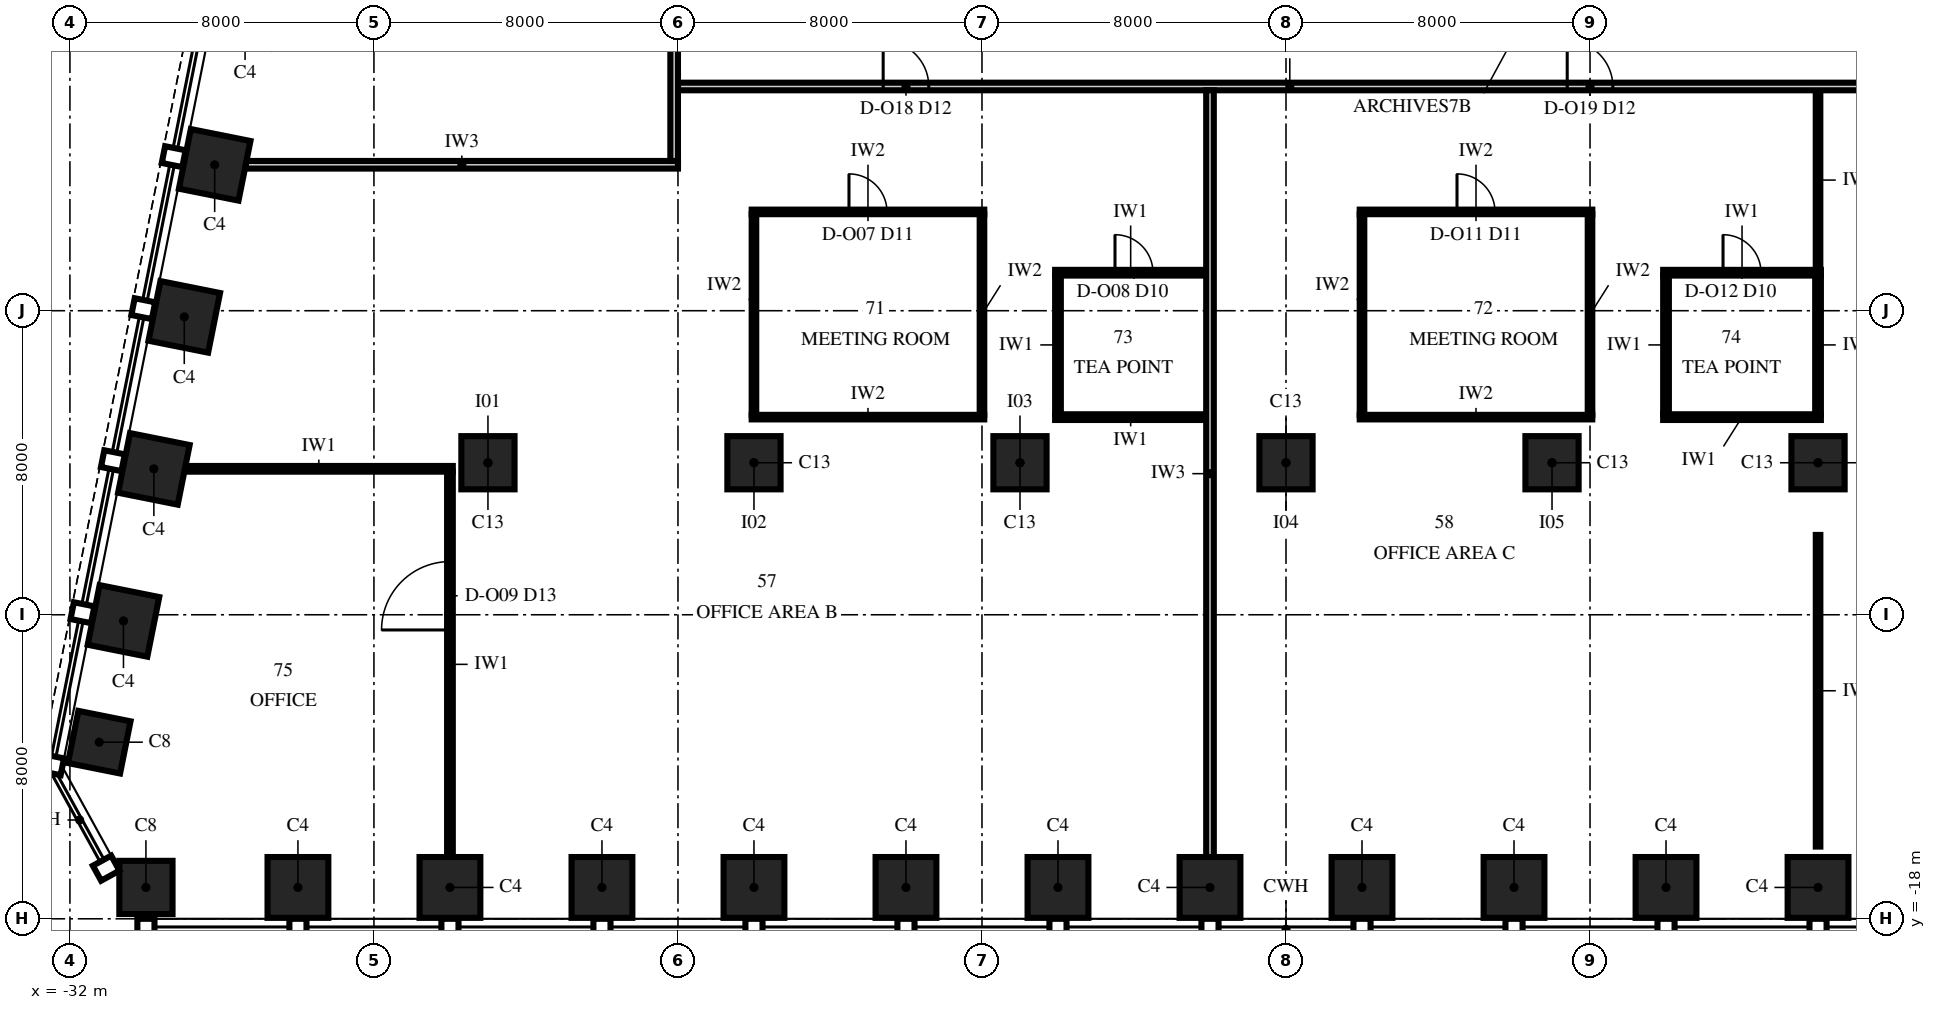
"""IFC4 building model, lengths in metres.
Left out: names, types, materials, properties, quantities, classifications, styles, units other than length and angle.
Written with IfcOpenShell. Run it as: python <this file> out.ifc"""

import sys

from ifc_helpers import new_model, si_unit, direction, frame, frame_2d, origin, origin_2d, place, context, subcontext, project, spatial, rectangle, extrude, element, fill, save


model = new_model("IFC4")
c1 = context("Model", 3, precision=1e-05, world=origin(), true_north=direction((0.0, 1.0)))
c2 = subcontext(c1, "Body", "Model", "MODEL_VIEW")
j1 = project(units=[si_unit("LENGTHUNIT", "METRE"), si_unit("PLANEANGLEUNIT", "RADIAN")], contexts=[c1])
p1 = place(None, origin())
s1 = spatial("IfcSite", under=j1, at=p1, CompositionType="ELEMENT")
p2 = place(p1, origin())
s2 = spatial("IfcBuilding", under=s1, at=p2, CompositionType="ELEMENT")
p3 = place(p2, frame((0.0, 0.0, 226.0)))
s3 = spatial("IfcBuildingStorey", under=s2, at=p3, CompositionType="ELEMENT", Elevation=226.0)
p4 = place(p3, frame((-30.0, -17.175, 0.0), z_axis=(0.0, 0.0, 1.0), x_axis=(1.0, 0.0, 0.0)))
e1 = element("IfcColumn", 1, at=p4, inside=s3, PredefinedType="COLUMN", context=c2, shape_type="SweptSolid", body=[
    extrude(rectangle(XDim=1.4, YDim=1.4, at=origin_2d()), origin(), (0.0, 0.0, 1.0), 4.0),
])
for number, where, z_axis, x_axis in (
    (2, (-26.0, -17.175, 0.0), (0.0, 0.0, 1.0), (1.0, 0.0, 0.0)),
    (3, (-22.0, -17.175, 0.0), (0.0, 0.0, 1.0), (1.0, 0.0, 0.0)),
    (4, (-18.0, -17.175, 0.0), (0.0, 0.0, 1.0), (1.0, 0.0, 0.0)),
    (5, (-14.0, -17.175, 0.0), (0.0, 0.0, 1.0), (1.0, 0.0, 0.0)),
    (6, (-10.0, -17.175, 0.0), (0.0, 0.0, 1.0), (1.0, 0.0, 0.0)),
    (7, (-6.0, -17.175, 0.0), (0.0, 0.0, 1.0), (1.0, 0.0, 0.0)),
    (8, (-2.0, -17.175, 0.0), (0.0, 0.0, 1.0), (1.0, 0.0, 0.0)),
    (9, (2.0, -17.175, 0.0), (0.0, 0.0, 1.0), (1.0, 0.0, 0.0)),
    (10, (6.0, -17.175, 0.0), (0.0, 0.0, 1.0), (1.0, 0.0, 0.0)),
    (11, (10.0, -17.175, 0.0), (0.0, 0.0, 1.0), (1.0, 0.0, 0.0)),
    (12, (14.0, -17.175, 0.0), (0.0, 0.0, 1.0), (1.0, 0.0, 0.0)),
    (13, (-28.191, 1.838, 0.0), (0.0, 0.0, 1.0), (-0.196, -0.981, 0.0)),
    (14, (-28.991, -2.162, 0.0), (0.0, 0.0, 1.0), (-0.196, -0.981, 0.0)),
    (15, (-29.791, -6.162, 0.0), (0.0, 0.0, 1.0), (-0.196, -0.981, 0.0)),
    (16, (-30.591, -10.162, 0.0), (0.0, 0.0, 1.0), (-0.196, -0.981, 0.0)),
):
    element("IfcColumn", number, at=place(p3, frame(where, z_axis=z_axis, x_axis=x_axis)), inside=s3, PredefinedType="COLUMN", context=c2, shape_type="SweptSolid", body=[
        extrude(rectangle(XDim=1.6, YDim=1.6, at=origin_2d()), origin(), (0.0, 0.0, 1.0), 4.0),
    ])
for number, where, z_axis, x_axis in (
    (17, (-31.229, -13.353, 0.0), (0.0, 0.0, 1.0), (-0.196, -0.981, 0.0)),
    (18, (-21.0, -6.0, 0.0), (0.0, 0.0, 1.0), (1.0, 0.0, 0.0)),
    (19, (-14.0, -6.0, 0.0), (0.0, 0.0, 1.0), (1.0, 0.0, 0.0)),
    (20, (-7.0, -6.0, 0.0), (0.0, 0.0, 1.0), (1.0, 0.0, 0.0)),
    (21, (0.0, -6.0, 0.0), (0.0, 0.0, 1.0), (1.0, 0.0, 0.0)),
    (22, (7.0, -6.0, 0.0), (0.0, 0.0, 1.0), (1.0, 0.0, 0.0)),
    (23, (14.0, -6.0, 0.0), (0.0, 0.0, 1.0), (1.0, 0.0, 0.0)),
):
    element("IfcColumn", number, at=place(p3, frame(where, z_axis=z_axis, x_axis=x_axis)), inside=s3, PredefinedType="COLUMN", context=c2, shape_type="SweptSolid", body=[
        extrude(rectangle(XDim=1.4, YDim=1.4, at=origin_2d()), origin(), (0.0, 0.0, 1.0), 4.0),
    ])
p5 = place(p3, frame((-28.975, -6.16, 0.0), z_axis=(0.0, 0.0, 1.0), x_axis=(1.0, 0.0, 0.0)))
e24 = element("IfcWall", 24, at=p5, inside=s3, PredefinedType="PARTITIONING", context=c2, shape_type="SweptSolid", body=[
    extrude(rectangle(XDim=7.05, YDim=0.15, at=frame_2d((3.525, 0.0))), origin(), (0.0, 0.0, 1.0), 2.842),
])
p6 = place(p3, frame((-14.06, -4.8, 0.0), z_axis=(0.0, 0.0, 1.0), x_axis=(1.0, 0.0, 0.0)))
e25 = element("IfcWall", 25, at=p6, inside=s3, PredefinedType="PARTITIONING", context=c2, shape_type="SweptSolid", body=[
    extrude(rectangle(XDim=6.12, YDim=0.12, at=frame_2d((3.06, 0.0))), origin(), (0.0, 0.0, 1.0), 3.25),
])
p7 = place(p3, frame((-6.075, -4.8, 0.0), z_axis=(0.0, 0.0, 1.0), x_axis=(1.0, 0.0, 0.0)))
e26 = element("IfcWall", 26, at=p7, inside=s3, PredefinedType="PARTITIONING", context=c2, shape_type="SweptSolid", body=[
    extrude(rectangle(XDim=3.975, YDim=0.15, at=frame_2d((1.987, 0.0))), origin(), (0.0, 0.0, 1.0), 3.25),
])
p8 = place(p3, frame((1.94, -4.8, 0.0), z_axis=(0.0, 0.0, 1.0), x_axis=(1.0, 0.0, 0.0)))
e27 = element("IfcWall", 27, at=p8, inside=s3, PredefinedType="PARTITIONING", context=c2, shape_type="SweptSolid", body=[
    extrude(rectangle(XDim=6.12, YDim=0.12, at=frame_2d((3.06, 0.0))), origin(), (0.0, 0.0, 1.0), 3.25),
])
p9 = place(p3, frame((9.925, -4.8, 0.0), z_axis=(0.0, 0.0, 1.0), x_axis=(1.0, 0.0, 0.0)))
e28 = element("IfcWall", 28, at=p9, inside=s3, PredefinedType="PARTITIONING", context=c2, shape_type="SweptSolid", body=[
    extrude(rectangle(XDim=4.15, YDim=0.15, at=frame_2d((2.075, 0.0))), origin(), (0.0, 0.0, 1.0), 3.25),
])
p10 = place(p3, frame((-6.075, -1.0, 0.0), z_axis=(0.0, 0.0, 1.0), x_axis=(1.0, 0.0, 0.0)))
e29 = element("IfcWall", 29, at=p10, inside=s3, PredefinedType="PARTITIONING", context=c2, shape_type="SweptSolid", body=[
    extrude(rectangle(XDim=3.975, YDim=0.15, at=frame_2d((1.987, 0.0))), origin(), (0.0, 0.0, 1.0), 3.25),
])
p11 = place(p10, frame((1.575, 0.0, 0.0)))
e30 = element("IfcOpeningElement", 30, at=p11, cuts=e29, PredefinedType="OPENING", context=c2, shape_type="SweptSolid", body=[
    extrude(rectangle(XDim=1.0, YDim=2.3, at=frame_2d((0.5, 1.15))), frame((0.0, 0.09, 0.0), z_axis=(0.0, -1.0, 0.0), x_axis=(1.0, 0.0, 0.0)), (0.0, 0.0, 1.0), 0.18),
])
p12 = place(p3, frame((9.925, -1.0, 0.0), z_axis=(0.0, 0.0, 1.0), x_axis=(1.0, 0.0, 0.0)))
e31 = element("IfcWall", 31, at=p12, inside=s3, PredefinedType="PARTITIONING", context=c2, shape_type="SweptSolid", body=[
    extrude(rectangle(XDim=4.15, YDim=0.15, at=frame_2d((2.075, 0.0))), origin(), (0.0, 0.0, 1.0), 3.25),
])
p13 = place(p12, frame((1.575, 0.0, 0.0)))
e32 = element("IfcOpeningElement", 32, at=p13, cuts=e31, PredefinedType="OPENING", context=c2, shape_type="SweptSolid", body=[
    extrude(rectangle(XDim=1.0, YDim=2.3, at=frame_2d((0.5, 1.15))), frame((0.0, 0.09, 0.0), z_axis=(0.0, -1.0, 0.0), x_axis=(1.0, 0.0, 0.0)), (0.0, 0.0, 1.0), 0.18),
])
p14 = place(p3, frame((-14.06, 0.6, 0.0), z_axis=(0.0, 0.0, 1.0), x_axis=(1.0, 0.0, 0.0)))
e33 = element("IfcWall", 33, at=p14, inside=s3, PredefinedType="PARTITIONING", context=c2, shape_type="SweptSolid", body=[
    extrude(rectangle(XDim=6.12, YDim=0.12, at=frame_2d((3.06, 0.0))), origin(), (0.0, 0.0, 1.0), 3.25),
])
p15 = place(p14, frame((2.56, 0.0, 0.0)))
e34 = element("IfcOpeningElement", 34, at=p15, cuts=e33, PredefinedType="OPENING", context=c2, shape_type="SweptSolid", body=[
    extrude(rectangle(XDim=1.0, YDim=2.4, at=frame_2d((0.5, 1.2))), frame((0.0, 0.075, 0.0), z_axis=(0.0, -1.0, 0.0), x_axis=(1.0, 0.0, 0.0)), (0.0, 0.0, 1.0), 0.15),
])
p16 = place(p3, frame((1.94, 0.6, 0.0), z_axis=(0.0, 0.0, 1.0), x_axis=(1.0, 0.0, 0.0)))
e35 = element("IfcWall", 35, at=p16, inside=s3, PredefinedType="PARTITIONING", context=c2, shape_type="SweptSolid", body=[
    extrude(rectangle(XDim=6.12, YDim=0.12, at=frame_2d((3.06, 0.0))), origin(), (0.0, 0.0, 1.0), 3.25),
])
p17 = place(p16, frame((2.56, 0.0, 0.0)))
e36 = element("IfcOpeningElement", 36, at=p17, cuts=e35, PredefinedType="OPENING", context=c2, shape_type="SweptSolid", body=[
    extrude(rectangle(XDim=1.0, YDim=2.4, at=frame_2d((0.5, 1.2))), frame((0.0, 0.075, 0.0), z_axis=(0.0, -1.0, 0.0), x_axis=(1.0, 0.0, 0.0)), (0.0, 0.0, 1.0), 0.15),
])
p18 = place(p3, frame((-27.375, 1.84, 0.0), z_axis=(0.0, 0.0, 1.0), x_axis=(1.0, 0.0, 0.0)))
e37 = element("IfcWall", 37, at=p18, inside=s3, PredefinedType="PARTITIONING", context=c2, shape_type="SweptSolid", body=[
    extrude(rectangle(XDim=11.375, YDim=0.2, at=frame_2d((5.688, 0.0))), origin(), (0.0, 0.0, 1.0), 3.25),
])
p19 = place(p3, frame((-16.0, 3.9, 0.0), z_axis=(0.0, 0.0, 1.0), x_axis=(1.0, 0.0, 0.0)))
e38 = element("IfcWall", 38, at=p19, inside=s3, PredefinedType="PARTITIONING", context=c2, shape_type="SweptSolid", body=[
    extrude(rectangle(XDim=32.2, YDim=0.2, at=frame_2d((16.1, 0.0))), origin(), (0.0, 0.0, 1.0), 3.25),
])
p20 = place(p19, frame((5.4, 0.0, 0.0)))
e39 = element("IfcOpeningElement", 39, at=p20, cuts=e38, PredefinedType="OPENING", context=c2, shape_type="SweptSolid", body=[
    extrude(rectangle(XDim=1.2, YDim=2.4, at=frame_2d((0.6, 1.2))), frame((0.0, 0.115, 0.0), z_axis=(0.0, -1.0, 0.0), x_axis=(1.0, 0.0, 0.0)), (0.0, 0.0, 1.0), 0.23),
])
p21 = place(p19, frame((23.4, 0.0, 0.0)))
e40 = element("IfcOpeningElement", 40, at=p21, cuts=e38, PredefinedType="OPENING", context=c2, shape_type="SweptSolid", body=[
    extrude(rectangle(XDim=1.2, YDim=2.4, at=frame_2d((0.6, 1.2))), frame((0.0, 0.115, 0.0), z_axis=(0.0, -1.0, 0.0), x_axis=(1.0, 0.0, 0.0)), (0.0, 0.0, 1.0), 0.23),
])
p22 = place(p3, frame((-22.0, -16.375, 0.0), z_axis=(0.0, 0.0, 1.0), x_axis=(0.0, 1.0, 0.0)))
e41 = element("IfcWall", 41, at=p22, inside=s3, PredefinedType="PARTITIONING", context=c2, shape_type="SweptSolid", body=[
    extrude(rectangle(XDim=10.14, YDim=0.15, at=frame_2d((5.07, 0.0))), origin(), (0.0, 0.0, 1.0), 3.25),
])
p23 = place(p22, frame((5.975, 0.0, 0.0)))
e42 = element("IfcOpeningElement", 42, at=p23, cuts=e41, PredefinedType="OPENING", context=c2, shape_type="SweptSolid", body=[
    extrude(rectangle(XDim=1.8, YDim=2.4, at=frame_2d((0.9, 1.2))), frame((0.0, 0.09, 0.0), z_axis=(0.0, -1.0, 0.0), x_axis=(1.0, 0.0, 0.0)), (0.0, 0.0, 1.0), 0.18),
])
p24 = place(p3, frame((-16.1, 1.94, 0.0), z_axis=(0.0, 0.0, 1.0), x_axis=(0.0, 1.0, 0.0)))
e43 = element("IfcWall", 43, at=p24, inside=s3, PredefinedType="PARTITIONING", context=c2, shape_type="SweptSolid", body=[
    extrude(rectangle(XDim=24.06, YDim=0.2, at=frame_2d((12.03, 0.0))), origin(), (0.0, 0.0, 1.0), 2.842),
])
p25 = place(p24, frame((6.46, 0.0, 0.0)))
e44 = element("IfcOpeningElement", 44, at=p25, cuts=e43, PredefinedType="OPENING", context=c2, shape_type="SweptSolid", body=[
    extrude(rectangle(XDim=1.2, YDim=2.4, at=frame_2d((0.6, 1.2))), frame((0.0, 0.115, 0.0), z_axis=(0.0, -1.0, 0.0), x_axis=(1.0, 0.0, 0.0)), (0.0, 0.0, 1.0), 0.23),
])
p26 = place(p3, frame((-14.0, -4.74, 0.0), z_axis=(0.0, 0.0, 1.0), x_axis=(0.0, 1.0, 0.0)))
e45 = element("IfcWall", 45, at=p26, inside=s3, PredefinedType="PARTITIONING", context=c2, shape_type="SweptSolid", body=[
    extrude(rectangle(XDim=5.28, YDim=0.12, at=frame_2d((2.64, 0.0))), origin(), (0.0, 0.0, 1.0), 3.25),
])
p27 = place(p3, frame((-8.0, -4.74, 0.0), z_axis=(0.0, 0.0, 1.0), x_axis=(0.0, 1.0, 0.0)))
e46 = element("IfcWall", 46, at=p27, inside=s3, PredefinedType="PARTITIONING", context=c2, shape_type="SweptSolid", body=[
    extrude(rectangle(XDim=5.28, YDim=0.12, at=frame_2d((2.64, 0.0))), origin(), (0.0, 0.0, 1.0), 3.85),
])
p28 = place(p3, frame((-6.0, -4.725, 0.0), z_axis=(0.0, 0.0, 1.0), x_axis=(0.0, 1.0, 0.0)))
e47 = element("IfcWall", 47, at=p28, inside=s3, PredefinedType="PARTITIONING", context=c2, shape_type="SweptSolid", body=[
    extrude(rectangle(XDim=3.65, YDim=0.15, at=frame_2d((1.825, 0.0))), origin(), (0.0, 0.0, 1.0), 3.25),
])
p29 = place(p3, frame((-2.0, -16.375, 0.0), z_axis=(0.0, 0.0, 1.0), x_axis=(0.0, 1.0, 0.0)))
e48 = element("IfcWall", 48, at=p29, inside=s3, PredefinedType="PARTITIONING", context=c2, shape_type="SweptSolid", body=[
    extrude(rectangle(XDim=20.175, YDim=0.2, at=frame_2d((10.087, 0.0))), origin(), (0.0, 0.0, 1.0), 2.842),
])
p30 = place(p3, frame((2.0, -4.74, 0.0), z_axis=(0.0, 0.0, 1.0), x_axis=(0.0, 1.0, 0.0)))
e49 = element("IfcWall", 49, at=p30, inside=s3, PredefinedType="PARTITIONING", context=c2, shape_type="SweptSolid", body=[
    extrude(rectangle(XDim=5.28, YDim=0.12, at=frame_2d((2.64, 0.0))), origin(), (0.0, 0.0, 1.0), 3.25),
])
p31 = place(p3, frame((8.0, -4.74, 0.0), z_axis=(0.0, 0.0, 1.0), x_axis=(0.0, 1.0, 0.0)))
e50 = element("IfcWall", 50, at=p31, inside=s3, PredefinedType="PARTITIONING", context=c2, shape_type="SweptSolid", body=[
    extrude(rectangle(XDim=5.28, YDim=0.12, at=frame_2d((2.64, 0.0))), origin(), (0.0, 0.0, 1.0), 3.85),
])
for number, where, z_axis, x_axis in (
    (51, (10.0, -4.725, 0.0), (0.0, 0.0, 1.0), (0.0, 1.0, 0.0)),
    (52, (14.0, -4.725, 0.0), (0.0, 0.0, 1.0), (0.0, 1.0, 0.0)),
):
    element("IfcWall", number, at=place(p3, frame(where, z_axis=z_axis, x_axis=x_axis)), inside=s3, PredefinedType="PARTITIONING", context=c2, shape_type="SweptSolid", body=[
        extrude(rectangle(XDim=3.65, YDim=0.15, at=frame_2d((1.825, 0.0))), origin(), (0.0, 0.0, 1.0), 3.25),
    ])
p32 = place(p3, frame((14.001, -16.1, 0.0), z_axis=(0.0, 0.0, 1.0), x_axis=(0.0, 1.0, 0.0)))
e53 = element("IfcWall", 53, at=p32, inside=s3, PredefinedType="PARTITIONING", context=c2, shape_type="SweptSolid", body=[
    extrude(rectangle(XDim=8.2, YDim=0.12, at=frame_2d((4.1, 0.0))), origin(), (0.0, 0.0, 1.0), 3.25),
])
p33 = place(p3, frame((14.0, -0.905, 0.0), z_axis=(0.0, 0.0, 1.0), x_axis=(0.0, 1.0, 0.0)))
e54 = element("IfcWall", 54, at=p33, inside=s3, PredefinedType="PARTITIONING", context=c2, shape_type="SweptSolid", body=[
    extrude(rectangle(XDim=4.685, YDim=0.12, at=frame_2d((2.343, 0.0))), origin(), (0.0, 0.0, 1.0), 3.25),
])
p34 = place(p15, origin())
e55 = element("IfcDoor", 55, at=p34, inside=s3, OperationType="SINGLE_SWING_RIGHT", PredefinedType="DOOR", context=c2, shape_type="SweptSolid", body=[
    extrude(rectangle(XDim=1.0, YDim=2.4, at=frame_2d((0.5, 1.2))), frame((0.0, 0.06, 0.0), z_axis=(0.0, -1.0, 0.0), x_axis=(1.0, 0.0, 0.0)), (0.0, 0.0, 1.0), 0.12),
])
fill(e34, e55)
p35 = place(p11, origin())
e56 = element("IfcDoor", 56, at=p35, inside=s3, OperationType="SINGLE_SWING_LEFT", PredefinedType="DOOR", context=c2, shape_type="SweptSolid", body=[
    extrude(rectangle(XDim=1.0, YDim=2.3, at=frame_2d((0.5, 1.15))), frame((0.0, 0.075, 0.0), z_axis=(0.0, -1.0, 0.0), x_axis=(1.0, 0.0, 0.0)), (0.0, 0.0, 1.0), 0.149),
])
fill(e30, e56)
p36 = place(p23, origin())
e57 = element("IfcDoor", 57, at=p36, inside=s3, OperationType="DOUBLE_DOOR_SINGLE_SWING", PredefinedType="DOOR", context=c2, shape_type="SweptSolid", body=[
    extrude(rectangle(XDim=1.8, YDim=2.4, at=frame_2d((0.9, 1.2))), frame((0.0, 0.075, 0.0), z_axis=(0.0, -1.0, 0.0), x_axis=(1.0, 0.0, 0.0)), (0.0, 0.0, 1.0), 0.149),
])
fill(e42, e57)
p37 = place(p17, origin())
e58 = element("IfcDoor", 58, at=p37, inside=s3, OperationType="SINGLE_SWING_RIGHT", PredefinedType="DOOR", context=c2, shape_type="SweptSolid", body=[
    extrude(rectangle(XDim=1.0, YDim=2.4, at=frame_2d((0.5, 1.2))), frame((0.0, 0.06, 0.0), z_axis=(0.0, -1.0, 0.0), x_axis=(1.0, 0.0, 0.0)), (0.0, 0.0, 1.0), 0.12),
])
fill(e36, e58)
p38 = place(p13, origin())
e59 = element("IfcDoor", 59, at=p38, inside=s3, OperationType="SINGLE_SWING_LEFT", PredefinedType="DOOR", context=c2, shape_type="SweptSolid", body=[
    extrude(rectangle(XDim=1.0, YDim=2.3, at=frame_2d((0.5, 1.15))), frame((0.0, 0.075, 0.0), z_axis=(0.0, -1.0, 0.0), x_axis=(1.0, 0.0, 0.0)), (0.0, 0.0, 1.0), 0.149),
])
fill(e32, e59)
p39 = place(p20, origin())
e60 = element("IfcDoor", 60, at=p39, inside=s3, OperationType="SINGLE_SWING_LEFT", PredefinedType="DOOR", context=c2, shape_type="SweptSolid", body=[
    extrude(rectangle(XDim=1.2, YDim=2.4, at=frame_2d((0.6, 1.2))), frame((0.0, 0.1, 0.0), z_axis=(0.0, -1.0, 0.0), x_axis=(1.0, 0.0, 0.0)), (0.0, 0.0, 1.0), 0.199),
])
fill(e39, e60)
p40 = place(p21, origin())
e61 = element("IfcDoor", 61, at=p40, inside=s3, OperationType="SINGLE_SWING_LEFT", PredefinedType="DOOR", context=c2, shape_type="SweptSolid", body=[
    extrude(rectangle(XDim=1.2, YDim=2.4, at=frame_2d((0.6, 1.2))), frame((0.0, 0.1, 0.0), z_axis=(0.0, -1.0, 0.0), x_axis=(1.0, 0.0, 0.0)), (0.0, 0.0, 1.0), 0.199),
])
fill(e40, e61)
save(model, sys.argv[1])
